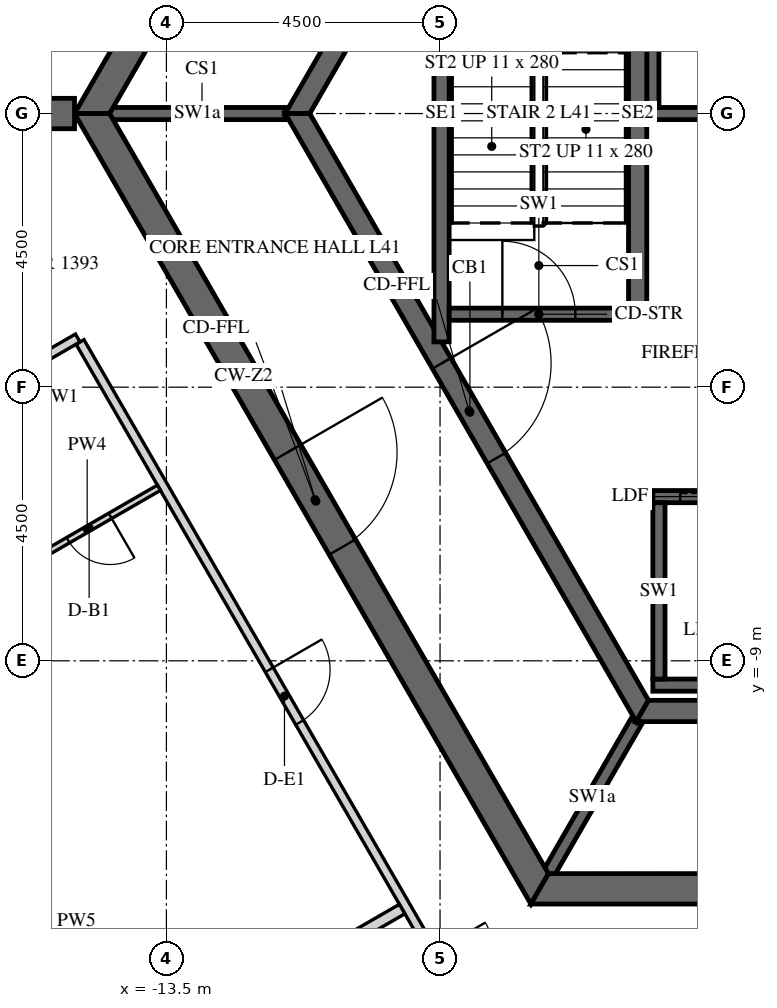
"""IFC4 building model, lengths in metres.
Left out: names, types, materials, properties, quantities, classifications, styles, units other than length and angle.
Written with IfcOpenShell. Run it as: python <this file> out.ifc"""

import sys

from ifc_helpers import new_model, si_unit, direction, frame, frame_2d, origin, place, context, subcontext, project, spatial, polyline, rectangle, outline, extrude, element, fill, save


model = new_model("IFC4")
c1 = context("Model", 3, precision=1e-05, world=origin(), true_north=direction((0.0, 1.0)))
c2 = subcontext(c1, "Body", "Model", "MODEL_VIEW")
j1 = project(units=[si_unit("LENGTHUNIT", "METRE"), si_unit("PLANEANGLEUNIT", "RADIAN")], contexts=[c1])
p1 = place(None, origin())
s1 = spatial("IfcSite", under=j1, at=p1, CompositionType="ELEMENT")
p2 = place(p1, origin())
s2 = spatial("IfcBuilding", under=s1, at=p2, CompositionType="ELEMENT")
p3 = place(p2, frame((0.0, 0.0, 176.1)))
s3 = spatial("IfcBuildingStorey", under=s2, at=p3, CompositionType="ELEMENT", Elevation=176.1)
p4 = place(p3, frame((-7.361, 12.75, -0.15), z_axis=(0.0, 0.0, 1.0), x_axis=(-0.50000571537, -0.866022103989, 0.0)))
e1 = element("IfcWall", 1, at=p4, inside=s3, PredefinedType="SHEAR", context=c2, shape_type="SweptSolid", body=[
    extrude(outline(polyline([(-0.144, -0.25), (14.867, -0.25), (14.578, 0.25), (0.144, 0.25), (-0.144, -0.25)])), origin(), (0.0, 0.0, 1.0), 3.9),
])
p5 = place(p4, frame((6.49, 0.0, 0.15)))
e2 = element("IfcOpeningElement", 2, at=p5, cuts=e1, PredefinedType="OPENING", context=c2, shape_type="SweptSolid", body=[
    extrude(rectangle(XDim=1.8, YDim=2.4, at=frame_2d((0.9, 1.2))), frame((0.0, 0.26, 0.0), z_axis=(0.0, -1.0, 0.0), x_axis=(1.0, 0.0, 0.0)), (0.0, 0.0, 1.0), 0.52),
])
p6 = place(p3, frame((-14.722, 0.0, -0.15), z_axis=(0.0, 0.0, 1.0), x_axis=(0.50000571537, -0.866022103989, 0.0)))
e3 = element("IfcWall", 3, at=p6, inside=s3, PredefinedType="SHEAR", context=c2, shape_type="SweptSolid", body=[
    extrude(outline(polyline([(-0.144, -0.25), (14.867, -0.25), (14.578, 0.25), (0.144, 0.25), (-0.144, -0.25)])), origin(), (0.0, 0.0, 1.0), 3.9),
])
p7 = place(p6, frame((6.432, 0.0, 0.15)))
e4 = element("IfcOpeningElement", 4, at=p7, cuts=e3, PredefinedType="OPENING", context=c2, shape_type="SweptSolid", body=[
    extrude(rectangle(XDim=1.8, YDim=2.4, at=frame_2d((0.9, 1.2))), frame((0.0, 0.26, 0.0), z_axis=(0.0, -1.0, 0.0), x_axis=(1.0, 0.0, 0.0)), (0.0, 0.0, 1.0), 0.52),
])
p8 = place(p3, frame((-7.361, -12.75, -0.15), z_axis=(0.0, 0.0, 1.0), x_axis=(1.0, 0.0, 0.0)))
e5 = element("IfcWall", 5, at=p8, inside=s3, PredefinedType="SHEAR", context=c2, shape_type="SweptSolid", body=[
    extrude(outline(polyline([(-0.144, -0.25), (14.866, -0.25), (14.578, 0.25), (0.144, 0.25), (-0.144, -0.25)])), origin(), (0.0, 0.0, 1.0), 3.9),
])
p9 = place(p8, frame((6.761, 0.0, 0.15)))
e6 = element("IfcOpeningElement", 6, at=p9, cuts=e5, PredefinedType="OPENING", context=c2, shape_type="SweptSolid", body=[
    extrude(rectangle(XDim=1.2, YDim=2.4, at=frame_2d((0.6, 1.2))), frame((0.0, 0.26, 0.0), z_axis=(0.0, -1.0, 0.0), x_axis=(1.0, 0.0, 0.0)), (0.0, 0.0, 1.0), 0.52),
])
p10 = place(p3, frame((-15.011, 0.0, -0.15), z_axis=(0.0, 0.0, 1.0), x_axis=(-1.0, 0.0, 0.0)))
e7 = element("IfcWall", 7, at=p10, inside=s3, PredefinedType="SHEAR", context=c2, shape_type="SweptSolid", body=[
    extrude(rectangle(XDim=15.424, YDim=0.5, at=frame_2d((7.712, 0.0))), origin(), (0.0, 0.0, 1.0), 3.9),
])
p11 = place(p10, frame((6.812, 0.0, 0.15)))
e8 = element("IfcOpeningElement", 8, at=p11, cuts=e7, PredefinedType="OPENING", context=c2, shape_type="SweptSolid", body=[
    extrude(rectangle(XDim=1.8, YDim=2.4, at=frame_2d((0.9, 1.2))), frame((0.0, 0.26, 0.0), z_axis=(0.0, -1.0, 0.0), x_axis=(1.0, 0.0, 0.0)), (0.0, 0.0, 1.0), 0.52),
])
p12 = place(p3, frame((-5.673, 9.825, -0.15), z_axis=(0.0, 0.0, 1.0), x_axis=(-0.499995046907, -0.866028263435, 0.0)))
e9 = element("IfcWall", 9, at=p12, inside=s3, PredefinedType="SHEAR", context=c2, shape_type="SweptSolid", body=[
    extrude(outline(polyline([(-0.101, -0.175), (11.446, -0.175), (11.244, 0.175), (0.101, 0.175), (-0.101, -0.175)])), origin(), (0.0, 0.0, 1.0), 3.9),
])
p13 = place(p12, frame((4.801, 0.0, 0.15)))
e10 = element("IfcOpeningElement", 10, at=p13, cuts=e9, PredefinedType="OPENING", context=c2, shape_type="SweptSolid", body=[
    extrude(rectangle(XDim=1.8, YDim=2.4, at=frame_2d((0.9, 1.2))), frame((0.0, 0.185, 0.0), z_axis=(0.0, -1.0, 0.0), x_axis=(1.0, 0.0, 0.0)), (0.0, 0.0, 1.0), 0.37),
])
p14 = place(p3, frame((-11.345, 0.0, -0.15), z_axis=(0.0, 0.0, 1.0), x_axis=(0.499995046907, -0.866028263435, 0.0)))
e11 = element("IfcWall", 11, at=p14, inside=s3, PredefinedType="SHEAR", context=c2, shape_type="SweptSolid", body=[
    extrude(outline(polyline([(-0.101, -0.175), (11.446, -0.175), (11.244, 0.175), (0.101, 0.175), (-0.101, -0.175)])), origin(), (0.0, 0.0, 1.0), 3.9),
])
p15 = place(p14, frame((4.744, 0.0, 0.15)))
e12 = element("IfcOpeningElement", 12, at=p15, cuts=e11, PredefinedType="OPENING", context=c2, shape_type="SweptSolid", body=[
    extrude(rectangle(XDim=1.8, YDim=2.4, at=frame_2d((0.9, 1.2))), frame((0.0, 0.185, 0.0), z_axis=(0.0, -1.0, 0.0), x_axis=(1.0, 0.0, 0.0)), (0.0, 0.0, 1.0), 0.37),
])
p16 = place(p3, frame((-5.673, -9.825, -0.15), z_axis=(0.0, 0.0, 1.0), x_axis=(1.0, 0.0, 0.0)))
e13 = element("IfcWall", 13, at=p16, inside=s3, PredefinedType="SHEAR", context=c2, shape_type="SweptSolid", body=[
    extrude(outline(polyline([(-0.101, -0.175), (11.446, -0.175), (11.244, 0.175), (0.101, 0.175), (-0.101, -0.175)])), origin(), (0.0, 0.0, 1.0), 3.9),
])
p17 = place(p3, frame((-5.6, 0.0, -0.25), z_axis=(0.0, 0.0, 1.0), x_axis=(1.0, 0.0, 0.0)))
e14 = element("IfcWall", 14, at=p17, inside=s3, PredefinedType="SHEAR", context=c2, shape_type="SweptSolid", body=[
    extrude(rectangle(XDim=11.2, YDim=0.2, at=frame_2d((5.6, 0.0))), origin(), (0.0, 0.0, 1.0), 3.9),
])
p18 = place(p3, frame((-5.5, 0.1, -0.25), z_axis=(0.0, 0.0, 1.0), x_axis=(0.0, 1.0, 0.0)))
e15 = element("IfcWall", 15, at=p18, inside=s3, PredefinedType="SHEAR", context=c2, shape_type="SweptSolid", body=[
    extrude(rectangle(XDim=3.1, YDim=0.2, at=frame_2d((1.55, 0.0))), origin(), (0.0, 0.0, 1.0), 3.9),
])
p19 = place(p3, frame((-5.5, -6.3, -0.25), z_axis=(0.0, 0.0, 1.0), x_axis=(1.0, 0.0, 0.0)))
e16 = element("IfcWall", 16, at=p19, inside=s3, PredefinedType="SHEAR", context=c2, shape_type="SweptSolid", body=[
    extrude(rectangle(XDim=9.2, YDim=0.2, at=frame_2d((4.6, 0.0))), origin(), (0.0, 0.0, 1.0), 3.9),
])
p20 = place(p19, frame((0.45, 0.0, 0.25)))
e17 = element("IfcOpeningElement", 17, at=p20, cuts=e16, PredefinedType="OPENING", context=c2, shape_type="SweptSolid", body=[
    extrude(rectangle(XDim=1.1, YDim=2.1, at=frame_2d((0.55, 1.05))), frame((0.0, 0.11, 0.0), z_axis=(0.0, -1.0, 0.0), x_axis=(1.0, 0.0, 0.0)), (0.0, 0.0, 1.0), 0.22),
])
p21 = place(p19, frame((2.25, 0.0, 0.25)))
e18 = element("IfcOpeningElement", 18, at=p21, cuts=e16, PredefinedType="OPENING", context=c2, shape_type="SweptSolid", body=[
    extrude(rectangle(XDim=1.1, YDim=2.1, at=frame_2d((0.55, 1.05))), frame((0.0, 0.11, 0.0), z_axis=(0.0, -1.0, 0.0), x_axis=(1.0, 0.0, 0.0)), (0.0, 0.0, 1.0), 0.22),
])
p22 = place(p19, frame((4.05, 0.0, 0.25)))
e19 = element("IfcOpeningElement", 19, at=p22, cuts=e16, PredefinedType="OPENING", context=c2, shape_type="SweptSolid", body=[
    extrude(rectangle(XDim=1.1, YDim=2.1, at=frame_2d((0.55, 1.05))), frame((0.0, 0.11, 0.0), z_axis=(0.0, -1.0, 0.0), x_axis=(1.0, 0.0, 0.0)), (0.0, 0.0, 1.0), 0.22),
])
p23 = place(p19, frame((5.85, 0.0, 0.25)))
e20 = element("IfcOpeningElement", 20, at=p23, cuts=e16, PredefinedType="OPENING", context=c2, shape_type="SweptSolid", body=[
    extrude(rectangle(XDim=1.1, YDim=2.1, at=frame_2d((0.55, 1.05))), frame((0.0, 0.11, 0.0), z_axis=(0.0, -1.0, 0.0), x_axis=(1.0, 0.0, 0.0)), (0.0, 0.0, 1.0), 0.22),
])
p24 = place(p19, frame((7.65, 0.0, 0.25)))
e21 = element("IfcOpeningElement", 21, at=p24, cuts=e16, PredefinedType="OPENING", context=c2, shape_type="SweptSolid", body=[
    extrude(rectangle(XDim=1.1, YDim=2.1, at=frame_2d((0.55, 1.05))), frame((0.0, 0.11, 0.0), z_axis=(0.0, -1.0, 0.0), x_axis=(1.0, 0.0, 0.0)), (0.0, 0.0, 1.0), 0.22),
])
p25 = place(p3, frame((-5.5, -9.4, -0.25), z_axis=(0.0, 0.0, 1.0), x_axis=(1.0, 0.0, 0.0)))
e22 = element("IfcWall", 22, at=p25, inside=s3, PredefinedType="SHEAR", context=c2, shape_type="SweptSolid", body=[
    extrude(rectangle(XDim=9.2, YDim=0.2, at=frame_2d((4.6, 0.0))), origin(), (0.0, 0.0, 1.0), 3.9),
])
p26 = place(p3, frame((-5.4, -9.3, -0.25), z_axis=(0.0, 0.0, 1.0), x_axis=(0.0, 1.0, 0.0)))
e23 = element("IfcWall", 23, at=p26, inside=s3, PredefinedType="SHEAR", context=c2, shape_type="SweptSolid", body=[
    extrude(rectangle(XDim=2.9, YDim=0.2, at=frame_2d((1.45, 0.0))), origin(), (0.0, 0.0, 1.0), 3.9),
])
for number, where, z_axis, x_axis in (
    (24, (-11.547, 0.0, -0.15), (0.0, 0.0, 1.0), (-1.0, 0.0, 0.0)),
    (25, (-5.773, -10.0, -0.15), (0.0, 0.0, 1.0), (-0.5, -0.866, 0.0)),
):
    element("IfcWall", number, at=place(p3, frame(where, z_axis=z_axis, x_axis=x_axis)), inside=s3, PredefinedType="SHEAR", context=c2, shape_type="SweptSolid", body=[
        extrude(rectangle(XDim=2.887, YDim=0.2, at=frame_2d((1.443, 0.0))), origin(), (0.0, 0.0, 1.0), 3.9),
    ])
p27 = place(p3, frame((-5.75, -3.4, -0.25), z_axis=(0.0, 0.0, 1.0), x_axis=(0.0, 1.0, 0.0)))
e26 = element("IfcWall", 26, at=p27, inside=s3, PredefinedType="SHEAR", context=c2, shape_type="SweptSolid", body=[
    extrude(rectangle(XDim=6.8, YDim=0.3, at=frame_2d((3.4, 0.0))), origin(), (0.0, 0.0, 1.0), 3.9),
])
p28 = place(p3, frame((-8.975, -3.755, -0.25), z_axis=(0.0, 0.0, 1.0), x_axis=(0.0, 1.0, 0.0)))
e27 = element("IfcWall", 27, at=p28, inside=s3, PredefinedType="SHEAR", context=c2, shape_type="SweptSolid", body=[
    extrude(rectangle(XDim=7.51, YDim=0.25, at=frame_2d((3.755, 0.0))), origin(), (0.0, 0.0, 1.0), 3.9),
])
p29 = place(p3, frame((-8.85, -3.3, -0.25), z_axis=(0.0, 0.0, 1.0), x_axis=(1.0, 0.0, 0.0)))
e28 = element("IfcWall", 28, at=p29, inside=s3, PredefinedType="SHEAR", context=c2, shape_type="SweptSolid", body=[
    extrude(rectangle(XDim=2.95, YDim=0.2, at=frame_2d((1.475, 0.0))), origin(), (0.0, 0.0, 1.0), 3.9),
])
p30 = place(p29, frame((0.875, 0.0, 0.25)))
e29 = element("IfcOpeningElement", 29, at=p30, cuts=e28, PredefinedType="OPENING", context=c2, shape_type="SweptSolid", body=[
    extrude(rectangle(XDim=1.2, YDim=2.4, at=frame_2d((0.6, 1.2))), frame((0.0, 0.11, 0.0), z_axis=(0.0, -1.0, 0.0), x_axis=(1.0, 0.0, 0.0)), (0.0, 0.0, 1.0), 0.22),
])
p31 = place(p3, frame((-14.921, -3.757, 0.0), z_axis=(0.0, 0.0, 1.0), x_axis=(0.500001980452, -0.866024260367, 0.0)))
e30 = element("IfcWall", 30, at=p31, inside=s3, PredefinedType="PARTITIONING", context=c2, shape_type="SweptSolid", body=[
    extrude(rectangle(XDim=12.752, YDim=0.15, at=frame_2d((6.376, 0.0))), origin(), (0.0, 0.0, 1.0), 2.988),
])
p32 = place(p31, frame((6.225, 0.0, 0.0)))
e31 = element("IfcOpeningElement", 31, at=p32, cuts=e30, PredefinedType="OPENING", context=c2, shape_type="SweptSolid", body=[
    extrude(rectangle(XDim=1.0, YDim=2.1, at=frame_2d((0.5, 1.05))), frame((0.0, 0.085, 0.0), z_axis=(0.0, -1.0, 0.0), x_axis=(1.0, 0.0, 0.0)), (0.0, 0.0, 1.0), 0.17),
])
p33 = place(p31, frame((11.602, 0.0, 0.0)))
e32 = element("IfcOpeningElement", 32, at=p33, cuts=e30, PredefinedType="OPENING", context=c2, shape_type="SweptSolid", body=[
    extrude(rectangle(XDim=1.0, YDim=2.1, at=frame_2d((0.5, 1.05))), frame((0.0, 0.085, 0.0), z_axis=(0.0, -1.0, 0.0), x_axis=(1.0, 0.0, 0.0)), (0.0, 0.0, 1.0), 0.17),
])
p34 = place(p3, frame((-16.259, -4.443, 0.0), z_axis=(0.0, 0.0, 1.0), x_axis=(0.866004263386, 0.500036614457, 0.0)))
e33 = element("IfcWall", 33, at=p34, inside=s3, PredefinedType="PARTITIONING", context=c2, shape_type="SweptSolid", body=[
    extrude(rectangle(XDim=1.502, YDim=0.15, at=frame_2d((0.751, 0.0))), origin(), (0.0, 0.0, 1.0), 2.988),
])
p35 = place(p3, frame((-13.623, -6.154, 0.0), z_axis=(0.0, 0.0, 1.0), x_axis=(-0.866051307416, -0.49995513091, 0.0)))
e34 = element("IfcWall", 34, at=p35, inside=s3, PredefinedType="PARTITIONING", context=c2, shape_type="SweptSolid", body=[
    extrude(rectangle(XDim=2.725, YDim=0.1, at=frame_2d((1.362, 0.0))), origin(), (0.0, 0.0, 1.0), 2.988),
])
p36 = place(p35, frame((0.925, 0.0, 0.0)))
e35 = element("IfcOpeningElement", 35, at=p36, cuts=e34, PredefinedType="OPENING", context=c2, shape_type="SweptSolid", body=[
    extrude(rectangle(XDim=0.8, YDim=2.1, at=frame_2d((0.4, 1.05))), frame((0.0, 0.06, 0.0), z_axis=(0.0, -1.0, 0.0), x_axis=(1.0, 0.0, 0.0)), (0.0, 0.0, 1.0), 0.12),
])
p37 = place(p3, frame((-16.529, -12.97, 0.0), z_axis=(0.0, 0.0, 1.0), x_axis=(0.499978980201, -0.866037539231, 0.0)))
e36 = element("IfcWall", 36, at=p37, inside=s3, PredefinedType="PARTITIONING", context=c2, shape_type="SweptSolid", body=[
    extrude(rectangle(XDim=3.46, YDim=0.1, at=frame_2d((1.73, 0.0))), origin(), (0.0, 0.0, 1.0), 2.988),
])
p38 = place(p37, frame((1.3, 0.0, 0.0)))
e37 = element("IfcOpeningElement", 37, at=p38, cuts=e36, PredefinedType="OPENING", context=c2, shape_type="SweptSolid", body=[
    extrude(rectangle(XDim=0.9, YDim=2.1, at=frame_2d((0.45, 1.05))), frame((0.0, 0.06, 0.0), z_axis=(0.0, -1.0, 0.0), x_axis=(1.0, 0.0, 0.0)), (0.0, 0.0, 1.0), 0.12),
])
p39 = place(p3, frame((-20.513, -19.37, 0.0), z_axis=(0.0, 0.0, 1.0), x_axis=(0.866019402111, 0.500010395058, 0.0)))
e38 = element("IfcWall", 38, at=p39, inside=s3, PredefinedType="PARTITIONING", context=c2, shape_type="SweptSolid", body=[
    extrude(rectangle(XDim=12.575, YDim=0.18, at=frame_2d((6.288, 0.0))), origin(), (0.0, 0.0, 1.0), 2.988),
])
p40 = place(p7, origin())
e39 = element("IfcDoor", 39, at=p40, inside=s3, OperationType="DOUBLE_DOOR_SINGLE_SWING", PredefinedType="DOOR", context=c2, shape_type="SweptSolid", body=[
    extrude(rectangle(XDim=1.8, YDim=2.4, at=frame_2d((0.9, 1.2))), frame((0.0, 0.025, 0.0), z_axis=(0.0, -1.0, 0.0), x_axis=(1.0, 0.0, 0.0)), (0.0, 0.0, 1.0), 0.05),
])
fill(e4, e39)
p41 = place(p15, origin())
e40 = element("IfcDoor", 40, at=p41, inside=s3, OperationType="DOUBLE_DOOR_SINGLE_SWING", PredefinedType="DOOR", context=c2, shape_type="SweptSolid", body=[
    extrude(rectangle(XDim=1.8, YDim=2.4, at=frame_2d((0.9, 1.2))), frame((0.0, 0.025, 0.0), z_axis=(0.0, -1.0, 0.0), x_axis=(1.0, 0.0, 0.0)), (0.0, 0.0, 1.0), 0.05),
])
fill(e12, e40)
p42 = place(p30, origin())
e41 = element("IfcDoor", 41, at=p42, inside=s3, OperationType="SINGLE_SWING_LEFT", PredefinedType="DOOR", context=c2, shape_type="SweptSolid", body=[
    extrude(rectangle(XDim=1.2, YDim=2.4, at=frame_2d((0.6, 1.2))), frame((0.0, 0.025, 0.0), z_axis=(0.0, -1.0, 0.0), x_axis=(1.0, 0.0, 0.0)), (0.0, 0.0, 1.0), 0.05),
])
fill(e29, e41)
p43 = place(p20, origin())
e42 = element("IfcDoor", 42, at=p43, inside=s3, OperationType="SLIDING_TO_LEFT", PredefinedType="DOOR", context=c2, shape_type="SweptSolid", body=[
    extrude(rectangle(XDim=1.1, YDim=2.1, at=frame_2d((0.55, 1.05))), frame((0.0, 0.025, 0.0), z_axis=(0.0, -1.0, 0.0), x_axis=(1.0, 0.0, 0.0)), (0.0, 0.0, 1.0), 0.05),
])
fill(e17, e42)
p44 = place(p32, origin())
e43 = element("IfcDoor", 43, at=p44, inside=s3, OperationType="SINGLE_SWING_LEFT", PredefinedType="DOOR", context=c2, shape_type="SweptSolid", body=[
    extrude(rectangle(XDim=1.0, YDim=2.1, at=frame_2d((0.5, 1.05))), frame((0.0, 0.025, 0.0), z_axis=(0.0, -1.0, 0.0), x_axis=(1.0, 0.0, 0.0)), (0.0, 0.0, 1.0), 0.05),
])
fill(e31, e43)
p45 = place(p36, origin())
e44 = element("IfcDoor", 44, at=p45, inside=s3, OperationType="SINGLE_SWING_RIGHT", PredefinedType="DOOR", context=c2, shape_type="SweptSolid", body=[
    extrude(rectangle(XDim=0.8, YDim=2.1, at=frame_2d((0.4, 1.05))), frame((0.0, 0.025, 0.0), z_axis=(0.0, -1.0, 0.0), x_axis=(1.0, 0.0, 0.0)), (0.0, 0.0, 1.0), 0.05),
])
fill(e35, e44)
save(model, sys.argv[1])
